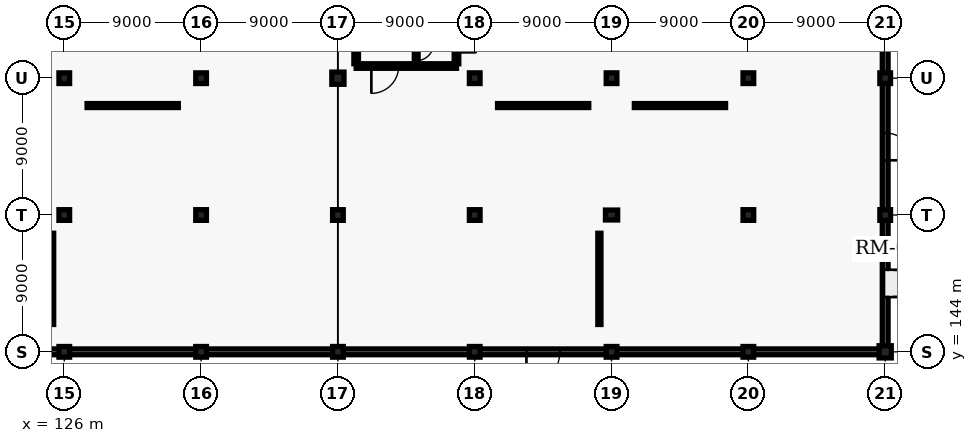
"""IFC4 building model, lengths in metres.
Left out: names, types, materials, properties, quantities, classifications, styles, units other than length and angle.
Written with IfcOpenShell. Run it as: python <this file> out.ifc"""

import sys

from ifc_helpers import new_model, si_unit, direction, frame, frame_2d, origin, origin_2d, place, context, subcontext, project, spatial, rectangle, circle, extrude, element, fill, save


model = new_model("IFC4")
c1 = context("Model", 3, precision=1e-05, world=origin(), true_north=direction((0.0, 1.0)))
c2 = subcontext(c1, "Body", "Model", "MODEL_VIEW")
j1 = project(units=[si_unit("LENGTHUNIT", "METRE"), si_unit("PLANEANGLEUNIT", "RADIAN")], contexts=[c1])
p1 = place(None, origin())
s1 = spatial("IfcSite", under=j1, at=p1, CompositionType="ELEMENT")
p2 = place(p1, origin())
s2 = spatial("IfcBuilding", under=s1, at=p2, CompositionType="ELEMENT")
p3 = place(p2, origin())
s3 = spatial("IfcBuildingStorey", under=s2, at=p3, CompositionType="ELEMENT", Elevation=0.0)
for number, where, z_axis, x_axis in (
    (1, (126.0, 144.0, 0.0), (0.0, 0.0, 1.0), (1.0, 0.0, 0.0)),
    (2, (126.0, 153.0, 0.0), (0.0, 0.0, 1.0), (1.0, 0.0, 0.0)),
    (3, (126.0, 162.0, 0.0), (0.0, 0.0, 1.0), (1.0, 0.0, 0.0)),
    (4, (135.0, 144.0, 0.0), (0.0, 0.0, 1.0), (1.0, 0.0, 0.0)),
    (5, (135.0, 153.0, 0.0), (0.0, 0.0, 1.0), (1.0, 0.0, 0.0)),
    (6, (135.0, 162.0, 0.0), (0.0, 0.0, 1.0), (1.0, 0.0, 0.0)),
    (7, (144.0, 144.0, 0.0), (0.0, 0.0, 1.0), (1.0, 0.0, 0.0)),
    (8, (144.0, 153.0, 0.0), (0.0, 0.0, 1.0), (1.0, 0.0, 0.0)),
):
    element("IfcColumn", number, at=place(p3, frame(where, z_axis=z_axis, x_axis=x_axis)), inside=s3, PredefinedType="COLUMN", context=c2, shape_type="SweptSolid", body=[
        extrude(rectangle(XDim=0.7, YDim=0.7, at=origin_2d()), origin(), (0.0, 0.0, 1.0), 5.4),
    ])
p4 = place(p3, frame((144.0, 162.0, 0.0), z_axis=(0.0, 0.0, 1.0), x_axis=(1.0, 0.0, 0.0)))
e9 = element("IfcColumn", 9, at=p4, inside=s3, PredefinedType="COLUMN", context=c2, shape_type="SweptSolid", body=[
    extrude(circle(Radius=0.4, at=origin_2d()), origin(), (0.0, 0.0, 1.0), 5.4),
])
for number, where, z_axis, x_axis in (
    (10, (153.0, 144.0, 0.0), (0.0, 0.0, 1.0), (1.0, 0.0, 0.0)),
    (11, (153.0, 153.0, 0.0), (0.0, 0.0, 1.0), (1.0, 0.0, 0.0)),
    (12, (153.0, 162.0, 0.0), (0.0, 0.0, 1.0), (1.0, 0.0, 0.0)),
    (13, (162.0, 144.0, 0.0), (0.0, 0.0, 1.0), (1.0, 0.0, 0.0)),
):
    element("IfcColumn", number, at=place(p3, frame(where, z_axis=z_axis, x_axis=x_axis)), inside=s3, PredefinedType="COLUMN", context=c2, shape_type="SweptSolid", body=[
        extrude(rectangle(XDim=0.7, YDim=0.7, at=origin_2d()), origin(), (0.0, 0.0, 1.0), 5.4),
    ])
p5 = place(p3, frame((162.0, 153.0, 0.0), z_axis=(0.0, 0.0, 1.0), x_axis=(1.0, 0.0, 0.0)))
e14 = element("IfcColumn", 14, at=p5, inside=s3, PredefinedType="COLUMN", context=c2, shape_type="SweptSolid", body=[
    extrude(rectangle(XDim=0.8, YDim=0.65, at=origin_2d()), origin(), (0.0, 0.0, 1.0), 5.4),
])
for number, where, z_axis, x_axis in (
    (15, (162.0, 162.0, 0.0), (0.0, 0.0, 1.0), (1.0, 0.0, 0.0)),
    (16, (171.0, 144.0, 0.0), (0.0, 0.0, 1.0), (1.0, 0.0, 0.0)),
    (17, (171.0, 153.0, 0.0), (0.0, 0.0, 1.0), (1.0, 0.0, 0.0)),
    (18, (171.0, 162.0, 0.0), (0.0, 0.0, 1.0), (1.0, 0.0, 0.0)),
):
    element("IfcColumn", number, at=place(p3, frame(where, z_axis=z_axis, x_axis=x_axis)), inside=s3, PredefinedType="COLUMN", context=c2, shape_type="SweptSolid", body=[
        extrude(rectangle(XDim=0.7, YDim=0.7, at=origin_2d()), origin(), (0.0, 0.0, 1.0), 5.4),
    ])
p6 = place(p3, frame((180.0, 144.0, 0.0), z_axis=(0.0, 0.0, 1.0), x_axis=(1.0, 0.0, 0.0)))
e19 = element("IfcColumn", 19, at=p6, inside=s3, PredefinedType="COLUMN", context=c2, shape_type="SweptSolid", body=[
    extrude(circle(Radius=0.4, at=origin_2d()), origin(), (0.0, 0.0, 1.0), 5.4),
])
for number, where, z_axis, x_axis in (
    (20, (180.0, 153.0, 0.0), (0.0, 0.0, 1.0), (1.0, 0.0, 0.0)),
    (21, (180.0, 162.0, 0.0), (0.0, 0.0, 1.0), (1.0, 0.0, 0.0)),
):
    element("IfcColumn", number, at=place(p3, frame(where, z_axis=z_axis, x_axis=x_axis)), inside=s3, PredefinedType="COLUMN", context=c2, shape_type="SweptSolid", body=[
        extrude(rectangle(XDim=0.7, YDim=0.7, at=origin_2d()), origin(), (0.0, 0.0, 1.0), 5.4),
    ])
p7 = place(p3, frame((180.0, 144.06, 0.0), z_axis=(0.0, 0.0, 1.0), x_axis=(0.0, 1.0, 0.0)))
e22 = element("IfcWall", 22, at=p7, inside=s3, PredefinedType="SOLIDWALL", context=c2, shape_type="SweptSolid", body=[
    extrude(rectangle(XDim=8.88, YDim=0.38, at=frame_2d((4.44, 0.0))), origin(), (0.0, 0.0, 1.0), 4.55),
])
p8 = place(p3, frame((180.0, 153.06, 0.0), z_axis=(0.0, 0.0, 1.0), x_axis=(0.0, 1.0, 0.0)))
e23 = element("IfcWall", 23, at=p8, inside=s3, PredefinedType="SOLIDWALL", context=c2, shape_type="SweptSolid", body=[
    extrude(rectangle(XDim=8.88, YDim=0.38, at=frame_2d((4.44, 0.0))), origin(), (0.0, 0.0, 1.0), 4.55),
])
p9 = place(p8, frame((3.54, 0.0, 0.0)))
e24 = element("IfcOpeningElement", 24, at=p9, cuts=e23, PredefinedType="OPENING", context=c2, shape_type="SweptSolid", body=[
    extrude(rectangle(XDim=1.8, YDim=2.15, at=frame_2d((0.9, 1.075))), frame((0.0, 0.2, 0.0), z_axis=(0.0, -1.0, 0.0), x_axis=(1.0, 0.0, 0.0)), (0.0, 0.0, 1.0), 0.4),
])
for number, where, z_axis, x_axis in (
    (25, (180.0, 162.06, 0.0), (0.0, 0.0, 1.0), (0.0, 1.0, 0.0)),
    (26, (117.06, 144.0, 0.0), (0.0, 0.0, 1.0), (1.0, 0.0, 0.0)),
    (27, (126.06, 144.0, 0.0), (0.0, 0.0, 1.0), (1.0, 0.0, 0.0)),
    (28, (135.06, 144.0, 0.0), (0.0, 0.0, 1.0), (1.0, 0.0, 0.0)),
    (29, (144.06, 144.0, 0.0), (0.0, 0.0, 1.0), (1.0, 0.0, 0.0)),
):
    element("IfcWall", number, at=place(p3, frame(where, z_axis=z_axis, x_axis=x_axis)), inside=s3, PredefinedType="SOLIDWALL", context=c2, shape_type="SweptSolid", body=[
        extrude(rectangle(XDim=8.88, YDim=0.38, at=frame_2d((4.44, 0.0))), origin(), (0.0, 0.0, 1.0), 4.55),
    ])
p10 = place(p3, frame((153.06, 144.0, 0.0), z_axis=(0.0, 0.0, 1.0), x_axis=(1.0, 0.0, 0.0)))
e30 = element("IfcWall", 30, at=p10, inside=s3, PredefinedType="SOLIDWALL", context=c2, shape_type="SweptSolid", body=[
    extrude(rectangle(XDim=8.88, YDim=0.38, at=frame_2d((4.44, 0.0))), origin(), (0.0, 0.0, 1.0), 4.55),
])
p11 = place(p10, frame((3.34, 0.0, 0.0)))
e31 = element("IfcOpeningElement", 31, at=p11, cuts=e30, PredefinedType="OPENING", context=c2, shape_type="SweptSolid", body=[
    extrude(rectangle(XDim=2.2, YDim=2.4, at=frame_2d((1.1, 1.2))), frame((0.0, 0.2, 0.0), z_axis=(0.0, -1.0, 0.0), x_axis=(1.0, 0.0, 0.0)), (0.0, 0.0, 1.0), 0.4),
])
for number, where, z_axis, x_axis in (
    (32, (162.06, 144.0, 0.0), (0.0, 0.0, 1.0), (1.0, 0.0, 0.0)),
    (33, (171.06, 144.0, 0.0), (0.0, 0.0, 1.0), (1.0, 0.0, 0.0)),
):
    element("IfcWall", number, at=place(p3, frame(where, z_axis=z_axis, x_axis=x_axis)), inside=s3, PredefinedType="SOLIDWALL", context=c2, shape_type="SweptSolid", body=[
        extrude(rectangle(XDim=8.88, YDim=0.38, at=frame_2d((4.44, 0.0))), origin(), (0.0, 0.0, 1.0), 4.55),
    ])
p12 = place(p3, frame((145.2, 162.8, 0.0), z_axis=(0.0, 0.0, 1.0), x_axis=(1.0, 0.0, 0.0)))
e34 = element("IfcWall", 34, at=p12, inside=s3, PredefinedType="SHEAR", context=c2, shape_type="SweptSolid", body=[
    extrude(rectangle(XDim=6.6, YDim=0.3, at=frame_2d((3.3, 0.0))), origin(), (0.0, 0.0, 1.0), 5.4),
])
p13 = place(p12, frame((1.0, 0.0, 0.0)))
e35 = element("IfcOpeningElement", 35, at=p13, cuts=e34, PredefinedType="OPENING", context=c2, shape_type="SweptSolid", body=[
    extrude(rectangle(XDim=1.8, YDim=2.15, at=frame_2d((0.9, 1.075))), frame((0.0, 0.16, 0.0), z_axis=(0.0, -1.0, 0.0), x_axis=(1.0, 0.0, 0.0)), (0.0, 0.0, 1.0), 0.32),
])
p14 = place(p3, frame((145.2, 162.95, 0.0), z_axis=(0.0, 0.0, 1.0), x_axis=(0.0, 1.0, 0.0)))
e36 = element("IfcWall", 36, at=p14, inside=s3, PredefinedType="SHEAR", context=c2, shape_type="SweptSolid", body=[
    extrude(rectangle(XDim=7.1, YDim=0.3, at=frame_2d((3.55, 0.0))), origin(), (0.0, 0.0, 1.0), 5.4),
])
p15 = place(p3, frame((151.8, 162.95, 0.0), z_axis=(0.0, 0.0, 1.0), x_axis=(0.0, 1.0, 0.0)))
e37 = element("IfcWall", 37, at=p15, inside=s3, PredefinedType="SHEAR", context=c2, shape_type="SweptSolid", body=[
    extrude(rectangle(XDim=7.1, YDim=0.3, at=frame_2d((3.55, 0.0))), origin(), (0.0, 0.0, 1.0), 5.4),
])
p16 = place(p15, frame((0.75, 0.0, 0.0)))
e38 = element("IfcOpeningElement", 38, at=p16, cuts=e37, PredefinedType="OPENING", context=c2, shape_type="SweptSolid", body=[
    extrude(rectangle(XDim=1.3, YDim=2.15, at=frame_2d((0.65, 1.075))), frame((0.0, 0.16, 0.0), z_axis=(0.0, -1.0, 0.0), x_axis=(1.0, 0.0, 0.0)), (0.0, 0.0, 1.0), 0.32),
])
p17 = place(p3, frame((149.15, 162.95, 0.0), z_axis=(0.0, 0.0, 1.0), x_axis=(0.0, 1.0, 0.0)))
e39 = element("IfcWall", 39, at=p17, inside=s3, PredefinedType="SHEAR", context=c2, shape_type="SweptSolid", body=[
    extrude(rectangle(XDim=7.1, YDim=0.25, at=frame_2d((3.55, 0.0))), origin(), (0.0, 0.0, 1.0), 5.4),
])
p18 = place(p17, frame((0.2, 0.0, 0.0)))
e40 = element("IfcOpeningElement", 40, at=p18, cuts=e39, PredefinedType="OPENING", context=c2, shape_type="SweptSolid", body=[
    extrude(rectangle(XDim=1.15, YDim=2.15, at=frame_2d((0.575, 1.075))), frame((0.0, 0.135, 0.0), z_axis=(0.0, -1.0, 0.0), x_axis=(1.0, 0.0, 0.0)), (0.0, 0.0, 1.0), 0.27),
])
p19 = place(p3, frame((127.5, 160.2, 0.0), z_axis=(0.0, 0.0, 1.0), x_axis=(1.0, 0.0, 0.0)))
e41 = element("IfcWall", 41, at=p19, inside=s3, PredefinedType="PARTITIONING", context=c2, shape_type="SweptSolid", body=[
    extrude(rectangle(XDim=6.0, YDim=0.26, at=frame_2d((3.0, 0.0))), origin(), (0.0, 0.0, 1.0), 4.3),
])
p20 = place(p19, frame((2.1, 0.0, 0.0)))
e42 = element("IfcOpeningElement", 42, at=p20, cuts=e41, PredefinedType="OPENING", context=c2, shape_type="SweptSolid", body=[
    extrude(rectangle(XDim=1.8, YDim=2.4, at=frame_2d((0.9, 1.2))), frame((0.0, 0.14, 0.0), z_axis=(0.0, -1.0, 0.0), x_axis=(1.0, 0.0, 0.0)), (0.0, 0.0, 1.0), 0.28),
])
p21 = place(p3, frame((154.5, 160.2, 0.0), z_axis=(0.0, 0.0, 1.0), x_axis=(1.0, 0.0, 0.0)))
e43 = element("IfcWall", 43, at=p21, inside=s3, PredefinedType="PARTITIONING", context=c2, shape_type="SweptSolid", body=[
    extrude(rectangle(XDim=6.0, YDim=0.26, at=frame_2d((3.0, 0.0))), origin(), (0.0, 0.0, 1.0), 4.3),
])
p22 = place(p21, frame((2.025, 0.0, 0.0)))
e44 = element("IfcOpeningElement", 44, at=p22, cuts=e43, PredefinedType="OPENING", context=c2, shape_type="SweptSolid", body=[
    extrude(rectangle(XDim=1.95, YDim=2.5, at=frame_2d((0.975, 1.25))), frame((0.0, 0.14, 0.0), z_axis=(0.0, -1.0, 0.0), x_axis=(1.0, 0.0, 0.0)), (0.0, 0.0, 1.0), 0.28),
])
p23 = place(p3, frame((163.5, 160.2, 0.0), z_axis=(0.0, 0.0, 1.0), x_axis=(1.0, 0.0, 0.0)))
e45 = element("IfcWall", 45, at=p23, inside=s3, PredefinedType="PARTITIONING", context=c2, shape_type="SweptSolid", body=[
    extrude(rectangle(XDim=6.0, YDim=0.26, at=frame_2d((3.0, 0.0))), origin(), (0.0, 0.0, 1.0), 4.3),
])
p24 = place(p23, frame((2.1, 0.0, 0.0)))
e46 = element("IfcOpeningElement", 46, at=p24, cuts=e45, PredefinedType="OPENING", context=c2, shape_type="SweptSolid", body=[
    extrude(rectangle(XDim=1.8, YDim=2.4, at=frame_2d((0.9, 1.2))), frame((0.0, 0.14, 0.0), z_axis=(0.0, -1.0, 0.0), x_axis=(1.0, 0.0, 0.0)), (0.0, 0.0, 1.0), 0.28),
])
p25 = place(p3, frame((125.2, 145.8, 0.0), z_axis=(0.0, 0.0, 1.0), x_axis=(0.0, 1.0, 0.0)))
e47 = element("IfcWall", 47, at=p25, inside=s3, PredefinedType="PARTITIONING", context=c2, shape_type="SweptSolid", body=[
    extrude(rectangle(XDim=6.0, YDim=0.205, at=frame_2d((3.0, 0.0))), origin(), (0.0, 0.0, 1.0), 4.3),
])
p26 = place(p25, frame((2.1, 0.0, 0.0)))
e48 = element("IfcOpeningElement", 48, at=p26, cuts=e47, PredefinedType="OPENING", context=c2, shape_type="SweptSolid", body=[
    extrude(rectangle(XDim=1.8, YDim=2.4, at=frame_2d((0.9, 1.2))), frame((0.0, 0.113, 0.0), z_axis=(0.0, -1.0, 0.0), x_axis=(1.0, 0.0, 0.0)), (0.0, 0.0, 1.0), 0.225),
])
p27 = place(p3, frame((161.2, 145.8, 0.0), z_axis=(0.0, 0.0, 1.0), x_axis=(0.0, 1.0, 0.0)))
e49 = element("IfcWall", 49, at=p27, inside=s3, PredefinedType="PARTITIONING", context=c2, shape_type="SweptSolid", body=[
    extrude(rectangle(XDim=6.0, YDim=0.205, at=frame_2d((3.0, 0.0))), origin(), (0.0, 0.0, 1.0), 4.3),
])
p28 = place(p27, frame((2.1, 0.0, 0.0)))
e50 = element("IfcOpeningElement", 50, at=p28, cuts=e49, PredefinedType="OPENING", context=c2, shape_type="SweptSolid", body=[
    extrude(rectangle(XDim=1.8, YDim=2.4, at=frame_2d((0.9, 1.2))), frame((0.0, 0.113, 0.0), z_axis=(0.0, -1.0, 0.0), x_axis=(1.0, 0.0, 0.0)), (0.0, 0.0, 1.0), 0.225),
])
p29 = place(p9, frame((1.8, 0.0, 0.0), z_axis=(0.0, 0.0, 1.0), x_axis=(-1.0, 0.0, 0.0)))
e51 = element("IfcDoor", 51, at=p29, inside=s3, OperationType="DOUBLE_DOOR_SINGLE_SWING", PredefinedType="DOOR", context=c2, shape_type="SweptSolid", body=[
    extrude(rectangle(XDim=1.8, YDim=2.15, at=frame_2d((0.9, 1.075))), frame((0.0, 0.025, 0.0), z_axis=(0.0, -1.0, 0.0), x_axis=(1.0, 0.0, 0.0)), (0.0, 0.0, 1.0), 0.05),
])
fill(e24, e51)
p30 = place(p11, frame((2.2, 0.0, 0.0), z_axis=(0.0, 0.0, 1.0), x_axis=(-1.0, 0.0, 0.0)))
e52 = element("IfcDoor", 52, at=p30, inside=s3, OperationType="DOUBLE_DOOR_SINGLE_SWING", PredefinedType="DOOR", context=c2, shape_type="SweptSolid", body=[
    extrude(rectangle(XDim=2.2, YDim=2.4, at=frame_2d((1.1, 1.2))), frame((0.0, 0.025, 0.0), z_axis=(0.0, -1.0, 0.0), x_axis=(1.0, 0.0, 0.0)), (0.0, 0.0, 1.0), 0.05),
])
fill(e31, e52)
p31 = place(p18, origin())
e53 = element("IfcDoor", 53, at=p31, inside=s3, OperationType="SINGLE_SWING_RIGHT", PredefinedType="DOOR", context=c2, shape_type="SweptSolid", body=[
    extrude(rectangle(XDim=1.15, YDim=2.15, at=frame_2d((0.575, 1.075))), frame((0.0, 0.025, 0.0), z_axis=(0.0, -1.0, 0.0), x_axis=(1.0, 0.0, 0.0)), (0.0, 0.0, 1.0), 0.05),
])
fill(e40, e53)
p32 = place(p13, frame((1.8, 0.0, 0.0), z_axis=(0.0, 0.0, 1.0), x_axis=(-1.0, 0.0, 0.0)))
e54 = element("IfcDoor", 54, at=p32, inside=s3, OperationType="DOUBLE_DOOR_SINGLE_SWING", PredefinedType="DOOR", context=c2, shape_type="SweptSolid", body=[
    extrude(rectangle(XDim=1.8, YDim=2.15, at=frame_2d((0.9, 1.075))), frame((0.0, 0.025, 0.0), z_axis=(0.0, -1.0, 0.0), x_axis=(1.0, 0.0, 0.0)), (0.0, 0.0, 1.0), 0.05),
])
fill(e35, e54)
p33 = place(p20, origin())
e55 = element("IfcDoor", 55, at=p33, inside=s3, OperationType="SLIDING_TO_LEFT", PredefinedType="DOOR", context=c2, shape_type="SweptSolid", body=[
    extrude(rectangle(XDim=1.8, YDim=2.4, at=frame_2d((0.9, 1.2))), frame((0.0, 0.025, 0.0), z_axis=(0.0, -1.0, 0.0), x_axis=(1.0, 0.0, 0.0)), (0.0, 0.0, 1.0), 0.05),
])
fill(e42, e55)
p34 = place(p22, origin())
e56 = element("IfcDoor", 56, at=p34, inside=s3, OperationType="SLIDING_TO_RIGHT", PredefinedType="DOOR", context=c2, shape_type="SweptSolid", body=[
    extrude(rectangle(XDim=1.95, YDim=2.5, at=frame_2d((0.975, 1.25))), frame((0.0, 0.025, 0.0), z_axis=(0.0, -1.0, 0.0), x_axis=(1.0, 0.0, 0.0)), (0.0, 0.0, 1.0), 0.05),
])
fill(e44, e56)
p35 = place(p24, origin())
e57 = element("IfcDoor", 57, at=p35, inside=s3, OperationType="SLIDING_TO_LEFT", PredefinedType="DOOR", context=c2, shape_type="SweptSolid", body=[
    extrude(rectangle(XDim=1.8, YDim=2.4, at=frame_2d((0.9, 1.2))), frame((0.0, 0.025, 0.0), z_axis=(0.0, -1.0, 0.0), x_axis=(1.0, 0.0, 0.0)), (0.0, 0.0, 1.0), 0.05),
])
fill(e46, e57)
p36 = place(p26, origin())
e58 = element("IfcDoor", 58, at=p36, inside=s3, OperationType="SLIDING_TO_LEFT", PredefinedType="DOOR", context=c2, shape_type="SweptSolid", body=[
    extrude(rectangle(XDim=1.8, YDim=2.4, at=frame_2d((0.9, 1.2))), frame((0.0, 0.025, 0.0), z_axis=(0.0, -1.0, 0.0), x_axis=(1.0, 0.0, 0.0)), (0.0, 0.0, 1.0), 0.05),
])
fill(e48, e58)
p37 = place(p28, origin())
e59 = element("IfcDoor", 59, at=p37, inside=s3, OperationType="SLIDING_TO_RIGHT", PredefinedType="DOOR", context=c2, shape_type="SweptSolid", body=[
    extrude(rectangle(XDim=1.8, YDim=2.4, at=frame_2d((0.9, 1.2))), frame((0.0, 0.025, 0.0), z_axis=(0.0, -1.0, 0.0), x_axis=(1.0, 0.0, 0.0)), (0.0, 0.0, 1.0), 0.05),
])
fill(e50, e59)
save(model, sys.argv[1])
